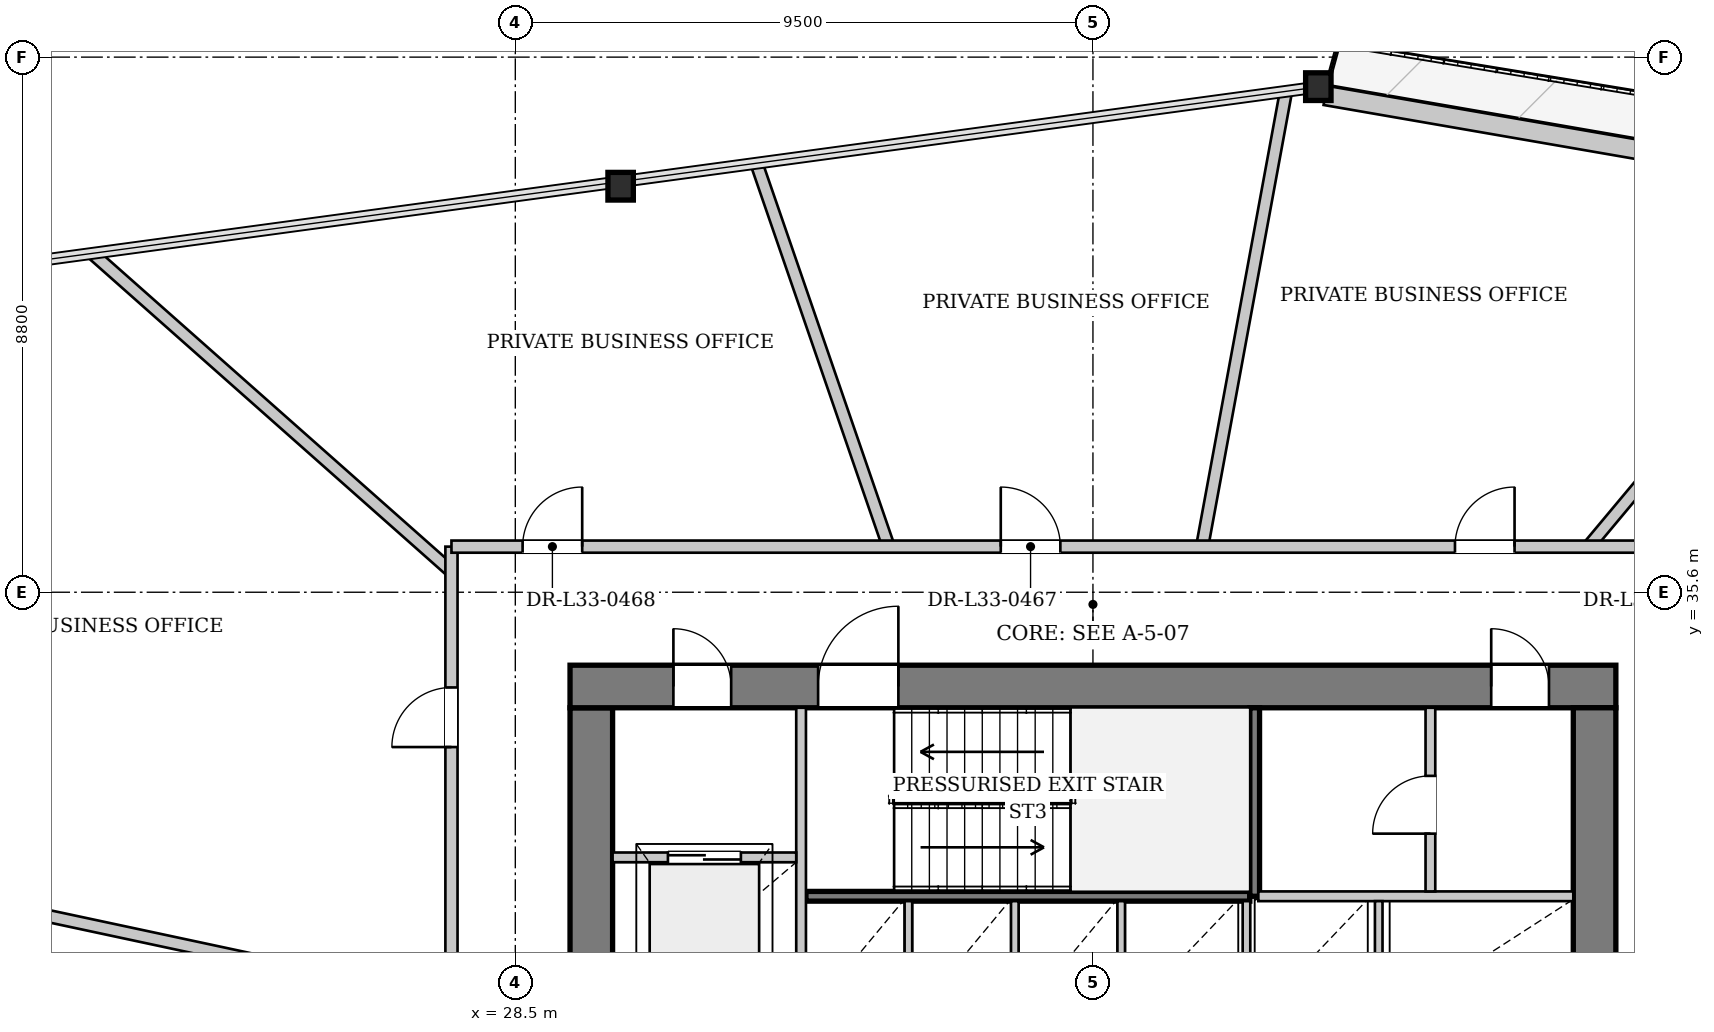
"""IFC4 building model, lengths in metres.
Left out: names, types, materials, properties, quantities, classifications, styles, units other than length and angle.
Written with IfcOpenShell. Run it as: python <this file> out.ifc"""

import sys

from ifc_helpers import new_model, si_unit, direction, frame, frame_2d, origin, origin_2d, place, context, subcontext, project, spatial, rectangle, i_section, extrude, source, transform, mapped, element, fill, save


model = new_model("IFC4")
c1 = context("Model", 3, precision=1e-05, world=origin(), true_north=direction((0.0, 1.0)))
c2 = subcontext(c1, "Body", "Model", "MODEL_VIEW")
j1 = project(units=[si_unit("LENGTHUNIT", "METRE"), si_unit("PLANEANGLEUNIT", "RADIAN")], contexts=[c1])
p1 = place(None, origin())
s1 = spatial("IfcSite", under=j1, at=p1, CompositionType="ELEMENT")
p2 = place(p1, origin())
s2 = spatial("IfcBuilding", under=s1, at=p2, CompositionType="ELEMENT")
p3 = place(p2, frame((0.0, 0.0, 127.0)))
s3 = spatial("IfcBuildingStorey", under=s2, at=p3, CompositionType="ELEMENT", Elevation=127.0)
m1 = source(origin(), c2, "Body", "SweptSolid", [
    extrude(i_section(OverallWidth=0.418, OverallDepth=0.455, WebThickness=0.038, FlangeThickness=0.059, at=origin_2d()), origin(), (0.0, 0.0, 1.0), 3.397),
])
p4 = place(p3, frame((41.848, 43.928, 0.0), z_axis=(-0.082941573755, -0.008193535016, 0.996520727997), x_axis=(0.098308305656, -0.995156006382, 0.0)))
e1 = element("IfcColumn", 1, at=p4, inside=s3, PredefinedType="COLUMN", context=c2, shape_type="MappedRepresentation", body=[
    mapped(m1, transform((0.0, 0.0, 0.0), x_axis=(1.0, 0.0, 0.0), y_axis=(0.0, 1.0, 0.0), z_axis=(0.0, 0.0, 1.0), scale=1.0)),
])
m2 = source(origin(), c2, "Body", "SweptSolid", [
    extrude(i_section(OverallWidth=0.418, OverallDepth=0.455, WebThickness=0.038, FlangeThickness=0.059, at=origin_2d()), origin(), (0.0, 0.0, 1.0), 3.399),
])
p5 = place(p3, frame((30.354, 42.368, 0.0), z_axis=(-0.071904457883, -0.053802636318, 0.995959349201), x_axis=(0.5991037677, -0.800671390477, 0.0)))
e2 = element("IfcColumn", 2, at=p5, inside=s3, PredefinedType="COLUMN", context=c2, shape_type="MappedRepresentation", body=[
    mapped(m2, transform((0.0, 0.0, 0.0), x_axis=(1.0, 0.0, 0.0), y_axis=(0.0, 1.0, 0.0), z_axis=(0.0, 0.0, 1.0), scale=1.0)),
])
p6 = place(p3, frame((41.82, 43.771, 0.0), z_axis=(0.0, 0.0, 1.0), x_axis=(0.98534400913, -0.170578966088, 0.0)))
e3 = element("IfcWall", 3, at=p6, inside=s3, PredefinedType="SOLIDWALL", context=c2, shape_type="SweptSolid", body=[
    extrude(rectangle(XDim=23.198, YDim=0.32, at=frame_2d((11.599, 0.0))), origin(), (0.0, 0.0, 1.0), 2.692),
])
p7 = place(p6, frame((6.873, 0.0, 0.0)))
e4 = element("IfcOpeningElement", 4, at=p7, cuts=e3, PredefinedType="OPENING", context=c2, shape_type="SweptSolid", body=[
    extrude(rectangle(XDim=1.1, YDim=2.3, at=frame_2d((0.55, 1.15))), frame((0.0, 0.17, 0.0), z_axis=(0.0, -1.0, 0.0), x_axis=(1.0, 0.0, 0.0)), (0.0, 0.0, 1.0), 0.34),
])
p8 = place(p6, frame((16.266, 0.0, 0.372)))
e5 = element("IfcOpeningElement", 5, at=p8, cuts=e3, PredefinedType="OPENING", context=c2, shape_type="SweptSolid", body=[
    extrude(rectangle(XDim=1.8, YDim=2.2, at=frame_2d((0.9, 1.1))), frame((0.0, 0.17, 0.0), z_axis=(0.0, -1.0, 0.0), x_axis=(1.0, 0.0, 0.0)), (0.0, 0.0, 1.0), 0.34),
])
p9 = place(p3, frame((29.75, 19.5, 0.0), z_axis=(0.0, 0.0, 1.0), x_axis=(0.0, 1.0, 0.0)))
e6 = element("IfcWall", 6, at=p9, inside=s3, PredefinedType="SHEAR", context=c2, shape_type="SweptSolid", body=[
    extrude(rectangle(XDim=14.2, YDim=0.7, at=frame_2d((7.1, 0.0))), origin(), (0.0, 0.0, 1.0), 3.3),
])
p10 = place(p9, frame((7.42, 0.0, 0.0)))
e7 = element("IfcOpeningElement", 7, at=p10, cuts=e6, PredefinedType="OPENING", context=c2, shape_type="SweptSolid", body=[
    extrude(rectangle(XDim=1.6, YDim=2.2, at=frame_2d((0.8, 1.1))), frame((0.0, 0.36, 0.0), z_axis=(0.0, -1.0, 0.0), x_axis=(1.0, 0.0, 0.0)), (0.0, 0.0, 1.0), 0.72),
])
p11 = place(p3, frame((29.4, 34.05, 0.0), z_axis=(0.0, 0.0, 1.0), x_axis=(1.0, 0.0, 0.0)))
e8 = element("IfcWall", 8, at=p11, inside=s3, PredefinedType="SHEAR", context=c2, shape_type="SweptSolid", body=[
    extrude(rectangle(XDim=17.2, YDim=0.7, at=frame_2d((8.6, 0.0))), origin(), (0.0, 0.0, 1.0), 3.3),
])
p12 = place(p11, frame((1.7, 0.0, 0.0)))
e9 = element("IfcOpeningElement", 9, at=p12, cuts=e8, PredefinedType="OPENING", context=c2, shape_type="SweptSolid", body=[
    extrude(rectangle(XDim=0.95, YDim=2.1, at=frame_2d((0.475, 1.05))), frame((0.0, 0.36, 0.0), z_axis=(0.0, -1.0, 0.0), x_axis=(1.0, 0.0, 0.0)), (0.0, 0.0, 1.0), 0.72),
])
p13 = place(p11, frame((4.08, 0.0, 0.0)))
e10 = element("IfcOpeningElement", 10, at=p13, cuts=e8, PredefinedType="OPENING", context=c2, shape_type="SweptSolid", body=[
    extrude(rectangle(XDim=1.32, YDim=2.2, at=frame_2d((0.66, 1.1))), frame((0.0, 0.36, 0.0), z_axis=(0.0, -1.0, 0.0), x_axis=(1.0, 0.0, 0.0)), (0.0, 0.0, 1.0), 0.72),
])
p14 = place(p11, frame((15.15, 0.0, 0.0)))
e11 = element("IfcOpeningElement", 11, at=p14, cuts=e8, PredefinedType="OPENING", context=c2, shape_type="SweptSolid", body=[
    extrude(rectangle(XDim=0.95, YDim=2.1, at=frame_2d((0.475, 1.05))), frame((0.0, 0.36, 0.0), z_axis=(0.0, -1.0, 0.0), x_axis=(1.0, 0.0, 0.0)), (0.0, 0.0, 1.0), 0.72),
])
p15 = place(p3, frame((46.25, 33.7, 0.0), z_axis=(0.0, 0.0, 1.0), x_axis=(0.0, -1.0, 0.0)))
e12 = element("IfcWall", 12, at=p15, inside=s3, PredefinedType="SHEAR", context=c2, shape_type="SweptSolid", body=[
    extrude(rectangle(XDim=14.2, YDim=0.7, at=frame_2d((7.1, 0.0))), origin(), (0.0, 0.0, 1.0), 3.3),
])
p16 = place(p15, frame((5.18, 0.0, 0.0)))
e13 = element("IfcOpeningElement", 13, at=p16, cuts=e12, PredefinedType="OPENING", context=c2, shape_type="SweptSolid", body=[
    extrude(rectangle(XDim=1.6, YDim=2.2, at=frame_2d((0.8, 1.1))), frame((0.0, 0.36, 0.0), z_axis=(0.0, -1.0, 0.0), x_axis=(1.0, 0.0, 0.0)), (0.0, 0.0, 1.0), 0.72),
])
p17 = place(p3, frame((33.28, 30.6, 0.0), z_axis=(0.0, 0.0, 1.0), x_axis=(1.0, 0.0, 0.0)))
e14 = element("IfcWall", 14, at=p17, inside=s3, PredefinedType="PARTITIONING", context=c2, shape_type="SweptSolid", body=[
    extrude(rectangle(XDim=7.3, YDim=0.16, at=frame_2d((3.65, 0.0))), origin(), (0.0, 0.0, 1.0), 3.3),
])
p18 = place(p3, frame((40.66, 30.6, 0.0), z_axis=(0.0, 0.0, 1.0), x_axis=(0.0, 1.0, 0.0)))
e15 = element("IfcWall", 15, at=p18, inside=s3, PredefinedType="PARTITIONING", context=c2, shape_type="SweptSolid", body=[
    extrude(rectangle(XDim=3.1, YDim=0.16, at=frame_2d((1.55, 0.0))), origin(), (0.0, 0.0, 1.0), 3.3),
])
p19 = place(p3, frame((33.2, 28.44, 0.0), z_axis=(0.0, 0.0, 1.0), x_axis=(0.0, 1.0, 0.0)))
e16 = element("IfcWall", 16, at=p19, inside=s3, PredefinedType="PARTITIONING", context=c2, shape_type="SweptSolid", body=[
    extrude(rectangle(XDim=5.26, YDim=0.16, at=frame_2d((2.63, 0.0))), origin(), (0.0, 0.0, 1.0), 3.3),
])
p20 = place(p3, frame((30.1, 31.24, 0.0), z_axis=(0.0, 0.0, 1.0), x_axis=(1.0, 0.0, 0.0)))
e17 = element("IfcWall", 17, at=p20, inside=s3, PredefinedType="PARTITIONING", context=c2, shape_type="SweptSolid", body=[
    extrude(rectangle(XDim=3.02, YDim=0.16, at=frame_2d((1.51, 0.0))), origin(), (0.0, 0.0, 1.0), 3.3),
])
p21 = place(p20, frame((0.91, 0.0, 0.0)))
e18 = element("IfcOpeningElement", 18, at=p21, cuts=e17, PredefinedType="OPENING", context=c2, shape_type="SweptSolid", body=[
    extrude(rectangle(XDim=1.2, YDim=2.2, at=frame_2d((0.6, 1.1))), frame((0.0, 0.09, 0.0), z_axis=(0.0, -1.0, 0.0), x_axis=(1.0, 0.0, 0.0)), (0.0, 0.0, 1.0), 0.18),
])
p22 = place(p3, frame((40.72, 30.6, 0.0), z_axis=(0.0, 0.0, 1.0), x_axis=(1.0, 0.0, 0.0)))
e19 = element("IfcWall", 19, at=p22, inside=s3, PredefinedType="PARTITIONING", context=c2, shape_type="SweptSolid", body=[
    extrude(rectangle(XDim=5.18, YDim=0.16, at=frame_2d((2.59, 0.0))), origin(), (0.0, 0.0, 1.0), 3.3),
])
for number, where, z_axis, x_axis in (
    (20, (34.965, 28.6, 0.0), (0.0, 0.0, 1.0), (0.0, 1.0, 0.0)),
    (21, (36.715, 28.6, 0.0), (0.0, 0.0, 1.0), (0.0, 1.0, 0.0)),
    (22, (38.465, 28.6, 0.0), (0.0, 0.0, 1.0), (0.0, 1.0, 0.0)),
    (23, (40.525, 28.6, 0.0), (0.0, 0.0, 1.0), (0.0, 1.0, 0.0)),
    (24, (42.7, 28.6, 0.0), (0.0, 0.0, 1.0), (0.0, 1.0, 0.0)),
):
    element("IfcWall", number, at=place(p3, frame(where, z_axis=z_axis, x_axis=x_axis)), inside=s3, PredefinedType="PARTITIONING", context=c2, shape_type="SweptSolid", body=[
        extrude(rectangle(XDim=1.92, YDim=0.125, at=frame_2d((0.96, 0.0))), origin(), (0.0, 0.0, 1.0), 3.3),
    ])
p23 = place(p3, frame((43.55, 30.68, 0.0), z_axis=(0.0, 0.0, 1.0), x_axis=(0.0, 1.0, 0.0)))
e25 = element("IfcWall", 25, at=p23, inside=s3, PredefinedType="PARTITIONING", context=c2, shape_type="SweptSolid", body=[
    extrude(rectangle(XDim=3.02, YDim=0.16, at=frame_2d((1.51, 0.0))), origin(), (0.0, 0.0, 1.0), 3.3),
])
p24 = place(p23, frame((0.95, 0.0, 0.0)))
e26 = element("IfcOpeningElement", 26, at=p24, cuts=e25, PredefinedType="OPENING", context=c2, shape_type="SweptSolid", body=[
    extrude(rectangle(XDim=0.95, YDim=2.1, at=frame_2d((0.475, 1.05))), frame((0.0, 0.09, 0.0), z_axis=(0.0, -1.0, 0.0), x_axis=(1.0, 0.0, 0.0)), (0.0, 0.0, 1.0), 0.18),
])
p25 = place(p3, frame((46.15, 36.35, 0.0), z_axis=(0.0, 0.0, 1.0), x_axis=(0.641321489546, 0.767272276996, 0.0)))
e27 = element("IfcWall", 27, at=p25, inside=s3, PredefinedType="PARTITIONING", context=c2, shape_type="SweptSolid", body=[
    extrude(rectangle(XDim=7.746, YDim=0.2, at=frame_2d((3.873, 0.0))), origin(), (0.0, 0.0, 1.0), 3.3),
])
p26 = place(p3, frame((39.796, 36.35, 0.0), z_axis=(0.0, 0.0, 1.0), x_axis=(0.181143577678, 0.983456661102, 0.0)))
e28 = element("IfcWall", 28, at=p26, inside=s3, PredefinedType="PARTITIONING", context=c2, shape_type="SweptSolid", body=[
    extrude(rectangle(XDim=7.581, YDim=0.2, at=frame_2d((3.791, 0.0))), origin(), (0.0, 0.0, 1.0), 2.785),
])
p27 = place(p3, frame((34.639, 36.35, 0.0), z_axis=(0.0, 0.0, 1.0), x_axis=(-0.325876208825, 0.945412447835, 0.0)))
e29 = element("IfcWall", 29, at=p27, inside=s3, PredefinedType="PARTITIONING", context=c2, shape_type="SweptSolid", body=[
    extrude(rectangle(XDim=6.638, YDim=0.2, at=frame_2d((3.319, 0.0))), origin(), (0.0, 0.0, 1.0), 3.3),
])
p28 = place(p3, frame((27.45, 35.943, 0.0), z_axis=(0.0, 0.0, 1.0), x_axis=(-0.748653900021, 0.662961038059, 0.0)))
e30 = element("IfcWall", 30, at=p28, inside=s3, PredefinedType="PARTITIONING", context=c2, shape_type="SweptSolid", body=[
    extrude(rectangle(XDim=7.849, YDim=0.2, at=frame_2d((3.925, 0.0))), origin(), (0.0, 0.0, 1.0), 3.3),
])
p29 = place(p3, frame((27.45, 28.856, 0.0), z_axis=(0.0, 0.0, 1.0), x_axis=(-0.977884605694, 0.209145159988, 0.0)))
e31 = element("IfcWall", 31, at=p29, inside=s3, PredefinedType="PARTITIONING", context=c2, shape_type="SweptSolid", body=[
    extrude(rectangle(XDim=10.857, YDim=0.2, at=frame_2d((5.429, 0.0))), origin(), (0.0, 0.0, 1.0), 3.3),
])
p30 = place(p3, frame((27.45, 16.85, 0.0), z_axis=(0.0, 0.0, 1.0), x_axis=(0.0, 1.0, 0.0)))
e32 = element("IfcWall", 32, at=p30, inside=s3, PredefinedType="PARTITIONING", context=c2, shape_type="SweptSolid", body=[
    extrude(rectangle(XDim=19.5, YDim=0.2, at=frame_2d((9.75, 0.0))), origin(), (0.0, 0.0, 1.0), 3.3),
])
p31 = place(p30, frame((16.204, 0.0, 0.0)))
e33 = element("IfcOpeningElement", 33, at=p31, cuts=e32, PredefinedType="OPENING", context=c2, shape_type="SweptSolid", body=[
    extrude(rectangle(XDim=0.98, YDim=2.15, at=frame_2d((0.49, 1.075))), frame((0.0, 0.11, 0.0), z_axis=(0.0, -1.0, 0.0), x_axis=(1.0, 0.0, 0.0)), (0.0, 0.0, 1.0), 0.22),
])
p32 = place(p30, frame((8.732, 0.0, 0.0)))
e34 = element("IfcOpeningElement", 34, at=p32, cuts=e32, PredefinedType="OPENING", context=c2, shape_type="SweptSolid", body=[
    extrude(rectangle(XDim=0.98, YDim=2.15, at=frame_2d((0.49, 1.075))), frame((0.0, 0.11, 0.0), z_axis=(0.0, -1.0, 0.0), x_axis=(1.0, 0.0, 0.0)), (0.0, 0.0, 1.0), 0.22),
])
p33 = place(p30, frame((0.485, 0.0, 0.0)))
e35 = element("IfcOpeningElement", 35, at=p33, cuts=e32, PredefinedType="OPENING", context=c2, shape_type="SweptSolid", body=[
    extrude(rectangle(XDim=0.98, YDim=2.15, at=frame_2d((0.49, 1.075))), frame((0.0, 0.11, 0.0), z_axis=(0.0, -1.0, 0.0), x_axis=(1.0, 0.0, 0.0)), (0.0, 0.0, 1.0), 0.22),
])
p34 = place(p3, frame((27.45, 36.35, 0.0), z_axis=(0.0, 0.0, 1.0), x_axis=(1.0, 0.0, 0.0)))
e36 = element("IfcWall", 36, at=p34, inside=s3, PredefinedType="PARTITIONING", context=c2, shape_type="SweptSolid", body=[
    extrude(rectangle(XDim=21.1, YDim=0.2, at=frame_2d((10.55, 0.0))), origin(), (0.0, 0.0, 1.0), 3.3),
])
p35 = place(p34, frame((19.82, 0.0, 0.0)))
e37 = element("IfcOpeningElement", 37, at=p35, cuts=e36, PredefinedType="OPENING", context=c2, shape_type="SweptSolid", body=[
    extrude(rectangle(XDim=0.98, YDim=2.15, at=frame_2d((0.49, 1.075))), frame((0.0, 0.11, 0.0), z_axis=(0.0, -1.0, 0.0), x_axis=(1.0, 0.0, 0.0)), (0.0, 0.0, 1.0), 0.22),
])
p36 = place(p34, frame((16.504, 0.0, 0.0)))
e38 = element("IfcOpeningElement", 38, at=p36, cuts=e36, PredefinedType="OPENING", context=c2, shape_type="SweptSolid", body=[
    extrude(rectangle(XDim=0.98, YDim=2.15, at=frame_2d((0.49, 1.075))), frame((0.0, 0.11, 0.0), z_axis=(0.0, -1.0, 0.0), x_axis=(1.0, 0.0, 0.0)), (0.0, 0.0, 1.0), 0.22),
])
p37 = place(p34, frame((9.034, 0.0, 0.0)))
e39 = element("IfcOpeningElement", 39, at=p37, cuts=e36, PredefinedType="OPENING", context=c2, shape_type="SweptSolid", body=[
    extrude(rectangle(XDim=0.98, YDim=2.15, at=frame_2d((0.49, 1.075))), frame((0.0, 0.11, 0.0), z_axis=(0.0, -1.0, 0.0), x_axis=(1.0, 0.0, 0.0)), (0.0, 0.0, 1.0), 0.22),
])
p38 = place(p34, frame((1.17, 0.0, 0.0)))
e40 = element("IfcOpeningElement", 40, at=p38, cuts=e36, PredefinedType="OPENING", context=c2, shape_type="SweptSolid", body=[
    extrude(rectangle(XDim=0.98, YDim=2.15, at=frame_2d((0.49, 1.075))), frame((0.0, 0.11, 0.0), z_axis=(0.0, -1.0, 0.0), x_axis=(1.0, 0.0, 0.0)), (0.0, 0.0, 1.0), 0.22),
])
m3 = source(origin(), c2, "Body", "SweptSolid", [
    extrude(rectangle(XDim=0.95, YDim=2.1, at=frame_2d((0.475, 1.05))), frame((0.0, 0.025, 0.0), z_axis=(0.0, -1.0, 0.0), x_axis=(1.0, 0.0, 0.0)), (0.0, 0.0, 1.0), 0.05),
])
p39 = place(p12, origin())
e41 = element("IfcDoor", 41, at=p39, inside=s3, OperationType="SINGLE_SWING_LEFT", PredefinedType="DOOR", context=c2, shape_type="MappedRepresentation", body=[
    mapped(m3, transform((0.0, 0.0, 0.0), x_axis=(1.0, 0.0, 0.0), y_axis=(0.0, 1.0, 0.0), z_axis=(0.0, 0.0, 1.0), scale=1.0)),
])
fill(e9, e41)
m4 = source(origin(), c2, "Body", "SweptSolid", [
    extrude(rectangle(XDim=1.32, YDim=2.2, at=frame_2d((0.66, 1.1))), frame((0.0, 0.025, 0.0), z_axis=(0.0, -1.0, 0.0), x_axis=(1.0, 0.0, 0.0)), (0.0, 0.0, 1.0), 0.05),
])
p40 = place(p13, origin())
e42 = element("IfcDoor", 42, at=p40, inside=s3, OperationType="SINGLE_SWING_RIGHT", PredefinedType="DOOR", context=c2, shape_type="MappedRepresentation", body=[
    mapped(m4, transform((0.0, 0.0, 0.0), x_axis=(1.0, 0.0, 0.0), y_axis=(0.0, 1.0, 0.0), z_axis=(0.0, 0.0, 1.0), scale=1.0)),
])
fill(e10, e42)
m5 = source(origin(), c2, "Body", "SweptSolid", [
    extrude(rectangle(XDim=1.2, YDim=2.2, at=frame_2d((0.6, 1.1))), frame((0.0, 0.025, 0.0), z_axis=(0.0, -1.0, 0.0), x_axis=(1.0, 0.0, 0.0)), (0.0, 0.0, 1.0), 0.05),
])
p41 = place(p21, origin())
e43 = element("IfcDoor", 43, at=p41, inside=s3, OperationType="DOUBLE_DOOR_SLIDING", PredefinedType="DOOR", context=c2, shape_type="MappedRepresentation", body=[
    mapped(m5, transform((0.0, 0.0, 0.0), x_axis=(1.0, 0.0, 0.0), y_axis=(0.0, 1.0, 0.0), z_axis=(0.0, 0.0, 1.0), scale=1.0)),
])
fill(e18, e43)
p42 = place(p24, origin())
e44 = element("IfcDoor", 44, at=p42, inside=s3, OperationType="SINGLE_SWING_LEFT", PredefinedType="DOOR", context=c2, shape_type="MappedRepresentation", body=[
    mapped(m3, transform((0.0, 0.0, 0.0), x_axis=(1.0, 0.0, 0.0), y_axis=(0.0, 1.0, 0.0), z_axis=(0.0, 0.0, 1.0), scale=1.0)),
])
fill(e26, e44)
p43 = place(p14, origin())
e45 = element("IfcDoor", 45, at=p43, inside=s3, OperationType="SINGLE_SWING_LEFT", PredefinedType="DOOR", context=c2, shape_type="MappedRepresentation", body=[
    mapped(m3, transform((0.0, 0.0, 0.0), x_axis=(1.0, 0.0, 0.0), y_axis=(0.0, 1.0, 0.0), z_axis=(0.0, 0.0, 1.0), scale=1.0)),
])
fill(e11, e45)
m6 = source(origin(), c2, "Body", "SweptSolid", [
    extrude(rectangle(XDim=0.98, YDim=2.15, at=frame_2d((0.49, 1.075))), frame((0.0, 0.025, 0.0), z_axis=(0.0, -1.0, 0.0), x_axis=(1.0, 0.0, 0.0)), (0.0, 0.0, 1.0), 0.05),
])
p44 = place(p31, origin())
e46 = element("IfcDoor", 46, at=p44, inside=s3, OperationType="SINGLE_SWING_LEFT", PredefinedType="DOOR", context=c2, shape_type="MappedRepresentation", body=[
    mapped(m6, transform((0.0, 0.0, 0.0), x_axis=(1.0, 0.0, 0.0), y_axis=(0.0, 1.0, 0.0), z_axis=(0.0, 0.0, 1.0), scale=1.0)),
])
fill(e33, e46)
p45 = place(p36, origin())
e47 = element("IfcDoor", 47, at=p45, inside=s3, OperationType="SINGLE_SWING_RIGHT", PredefinedType="DOOR", context=c2, shape_type="MappedRepresentation", body=[
    mapped(m6, transform((0.0, 0.0, 0.0), x_axis=(1.0, 0.0, 0.0), y_axis=(0.0, 1.0, 0.0), z_axis=(0.0, 0.0, 1.0), scale=1.0)),
])
fill(e38, e47)
p46 = place(p37, origin())
e48 = element("IfcDoor", 48, at=p46, inside=s3, OperationType="SINGLE_SWING_LEFT", PredefinedType="DOOR", context=c2, shape_type="MappedRepresentation", body=[
    mapped(m6, transform((0.0, 0.0, 0.0), x_axis=(1.0, 0.0, 0.0), y_axis=(0.0, 1.0, 0.0), z_axis=(0.0, 0.0, 1.0), scale=1.0)),
])
fill(e39, e48)
p47 = place(p38, origin())
e49 = element("IfcDoor", 49, at=p47, inside=s3, OperationType="SINGLE_SWING_RIGHT", PredefinedType="DOOR", context=c2, shape_type="MappedRepresentation", body=[
    mapped(m6, transform((0.0, 0.0, 0.0), x_axis=(1.0, 0.0, 0.0), y_axis=(0.0, 1.0, 0.0), z_axis=(0.0, 0.0, 1.0), scale=1.0)),
])
fill(e40, e49)
save(model, sys.argv[1])
